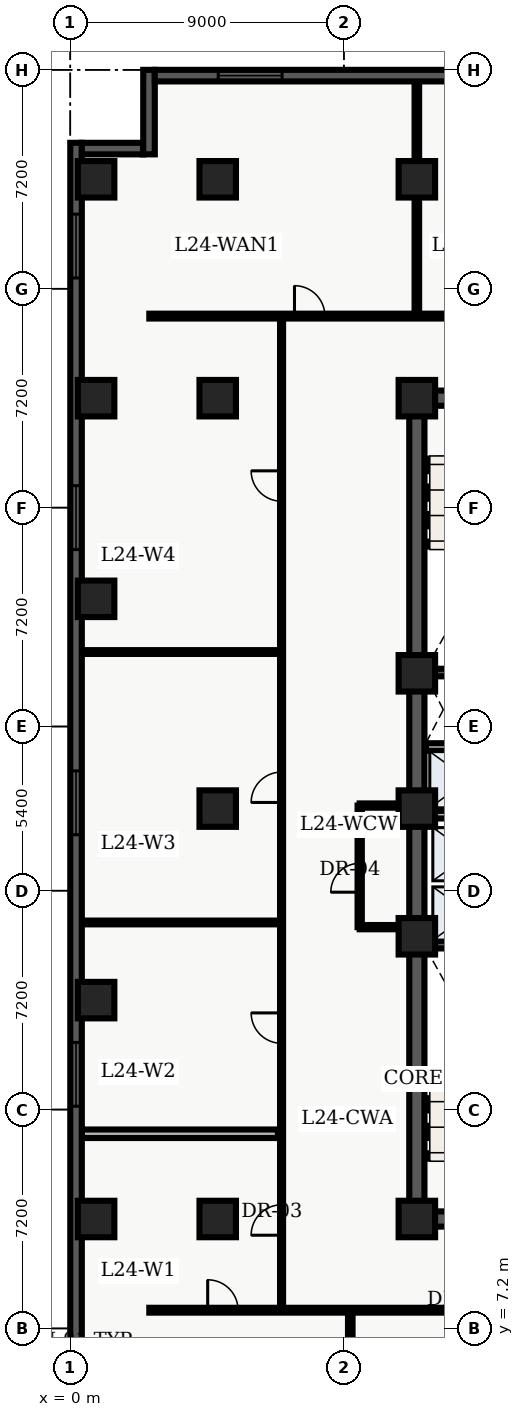
"""IFC4 building model, lengths in metres.
Left out: names, types, materials, properties, quantities, classifications, styles, units other than length and angle.
Written with IfcOpenShell. Run it as: python <this file> out.ifc"""

import sys

from ifc_helpers import new_model, entity, si_unit, converted_unit, direction, frame, origin_with_axes, origin_2d_with_axis, place, context, subcontext, project, spatial, polyline, rectangle, outline, extrude, element, fill, save


model = new_model("IFC4")
c1 = context("Model", 3, precision=1e-05, world=origin_with_axes(), true_north=direction((0.0, 1.0)))
c2 = subcontext(c1, "Body", "Model", "MODEL_VIEW")
j1 = project(units=[si_unit("LENGTHUNIT", "METRE"), converted_unit("PLANEANGLEUNIT", "DEGREE", entity("IfcPlaneAngleMeasure", 0.017), si_unit("PLANEANGLEUNIT", "RADIAN"), dimensions=[0, 0, 0, 0, 0, 0, 0])], contexts=[c1])
p1 = place(None, origin_with_axes())
s1 = spatial("IfcSite", under=j1, at=p1, CompositionType="ELEMENT")
p2 = place(p1, origin_with_axes())
s2 = spatial("IfcBuilding", under=s1, at=p2, CompositionType="ELEMENT")
p3 = place(p2, frame((0.0, 0.0, 100.8), z_axis=(0.0, 0.0, 1.0), x_axis=(1.0, 0.0, 0.0)))
s3 = spatial("IfcBuildingStorey", under=s2, at=p3, CompositionType="ELEMENT", Elevation=100.8)
p4 = place(p3, frame((11.4, 10.8, 0.0), z_axis=(0.0, 0.0, 1.0), x_axis=(0.0, 1.0, 0.0)))
e1 = element("IfcWall", 1, at=p4, inside=s3, PredefinedType="SHEAR", context=c2, shape_type="SweptSolid", body=[
    extrude(outline(polyline([(0.0, -0.25), (27.0, -0.25), (27.0, 0.25), (0.0, 0.25), (0.0, -0.25)])), origin_with_axes(), (0.0, 0.0, 1.0), 3.66),
])
p5 = place(p3, frame((11.4, 10.8, 0.0), z_axis=(0.0, 0.0, 1.0), x_axis=(1.0, 0.0, 0.0)))
e2 = element("IfcWall", 2, at=p5, inside=s3, PredefinedType="SHEAR", context=c2, shape_type="SweptSolid", body=[
    extrude(outline(polyline([(0.0, -0.25), (7.2, -0.25), (7.2, 0.25), (0.0, 0.25), (0.0, -0.25)])), origin_with_axes(), (0.0, 0.0, 1.0), 3.66),
])
p6 = place(p5, frame((2.625, 0.0, 0.0), z_axis=(0.0, 0.0, 1.0), x_axis=(1.0, 0.0, 0.0)))
e3 = element("IfcOpeningElement", 3, at=p6, cuts=e2, PredefinedType="OPENING", context=c2, shape_type="SweptSolid", body=[
    extrude(rectangle(XDim=1.05, YDim=0.52, at=origin_2d_with_axis()), origin_with_axes(), (0.0, 0.0, 1.0), 2.15),
])
p7 = place(p3, frame((11.4, 37.8, 0.0), z_axis=(0.0, 0.0, 1.0), x_axis=(1.0, 0.0, 0.0)))
e4 = element("IfcWall", 4, at=p7, inside=s3, PredefinedType="SHEAR", context=c2, shape_type="SweptSolid", body=[
    extrude(outline(polyline([(0.0, -0.25), (7.2, -0.25), (7.2, 0.25), (0.0, 0.25), (0.0, -0.25)])), origin_with_axes(), (0.0, 0.0, 1.0), 3.66),
])
p8 = place(p7, frame((2.625, 0.0, 0.0), z_axis=(0.0, 0.0, 1.0), x_axis=(1.0, 0.0, 0.0)))
e5 = element("IfcOpeningElement", 5, at=p8, cuts=e4, PredefinedType="OPENING", context=c2, shape_type="SweptSolid", body=[
    extrude(rectangle(XDim=1.05, YDim=0.52, at=origin_2d_with_axis()), origin_with_axes(), (0.0, 0.0, 1.0), 2.15),
])
for number, where, z_axis, x_axis in (
    (6, (11.65, 19.825, 0.0), (0.0, 0.0, 1.0), (1.0, 0.0, 0.0)),
    (7, (11.65, 28.775, 0.0), (0.0, 0.0, 1.0), (1.0, 0.0, 0.0)),
):
    element("IfcWall", number, at=place(p3, frame(where, z_axis=z_axis, x_axis=x_axis)), inside=s3, PredefinedType="SHEAR", context=c2, shape_type="SweptSolid", body=[
        extrude(outline(polyline([(0.0, -0.125), (6.7, -0.125), (6.7, 0.125), (0.0, 0.125), (0.0, -0.125)])), origin_with_axes(), (0.0, 0.0, 1.0), 3.66),
    ])
p9 = place(p3, frame((11.7, 24.1, 0.0), z_axis=(0.0, 0.0, 1.0), x_axis=(1.0, 0.0, 0.0)))
e8 = element("IfcWall", 8, at=p9, inside=s3, PredefinedType="SOLIDWALL", context=c2, shape_type="SweptSolid", body=[
    extrude(outline(polyline([(0.0, -0.125), (6.6, -0.125), (6.6, 0.125), (0.0, 0.125), (0.0, -0.125)])), origin_with_axes(), (0.0, 0.0, 1.0), 2.7),
])
p10 = place(p9, frame((3.75, 0.0, 0.0), z_axis=(0.0, 0.0, 1.0), x_axis=(1.0, 0.0, 0.0)))
e9 = element("IfcOpeningElement", 9, at=p10, cuts=e8, PredefinedType="OPENING", context=c2, shape_type="SweptSolid", body=[
    extrude(rectangle(XDim=0.9, YDim=0.27, at=origin_2d_with_axis()), origin_with_axes(), (0.0, 0.0, 1.0), 2.15),
])
p11 = place(p3, frame((11.7, 26.325, 0.0), z_axis=(0.0, 0.0, 1.0), x_axis=(1.0, 0.0, 0.0)))
e10 = element("IfcWall", 10, at=p11, inside=s3, PredefinedType="SOLIDWALL", context=c2, shape_type="SweptSolid", body=[
    extrude(outline(polyline([(0.0, -0.125), (6.6, -0.125), (6.6, 0.125), (0.0, 0.125), (0.0, -0.125)])), origin_with_axes(), (0.0, 0.0, 1.0), 2.7),
])
p12 = place(p11, frame((3.5, 0.0, 0.0), z_axis=(0.0, 0.0, 1.0), x_axis=(1.0, 0.0, 0.0)))
e11 = element("IfcOpeningElement", 11, at=p12, cuts=e10, PredefinedType="OPENING", context=c2, shape_type="SweptSolid", body=[
    extrude(rectangle(XDim=0.9, YDim=0.27, at=origin_2d_with_axis()), origin_with_axes(), (0.0, 0.0, 1.0), 2.15),
])
for number, where, z_axis, x_axis in (
    (12, (11.4, 10.8, 0.0), (0.0, 0.0, 1.0), (1.0, 0.0, 0.0)),
    (13, (11.4, 20.1, 0.0), (0.0, 0.0, 1.0), (1.0, 0.0, 0.0)),
    (14, (11.4, 24.3, 0.0), (0.0, 0.0, 1.0), (1.0, 0.0, 0.0)),
    (15, (11.4, 28.75, 0.0), (0.0, 0.0, 1.0), (1.0, 0.0, 0.0)),
    (16, (11.4, 37.8, 0.0), (0.0, 0.0, 1.0), (1.0, 0.0, 0.0)),
    (17, (11.4, 45.0, 0.0), (0.0, 0.0, 1.0), (1.0, 0.0, 0.0)),
    (18, (4.85, 10.8, 0.0), (0.0, 0.0, 1.0), (1.0, 0.0, 0.0)),
    (19, (4.85, 24.3, 0.0), (0.0, 0.0, 1.0), (1.0, 0.0, 0.0)),
    (20, (4.85, 37.8, 0.0), (0.0, 0.0, 1.0), (1.0, 0.0, 0.0)),
    (21, (4.85, 45.0, 0.0), (0.0, 0.0, 1.0), (1.0, 0.0, 0.0)),
    (22, (0.85, 10.8, 0.0), (0.0, 0.0, 1.0), (1.0, 0.0, 0.0)),
    (23, (0.85, 18.0, 0.0), (0.0, 0.0, 1.0), (1.0, 0.0, 0.0)),
    (24, (0.85, 31.2, 0.0), (0.0, 0.0, 1.0), (1.0, 0.0, 0.0)),
    (25, (0.85, 37.8, 0.0), (0.0, 0.0, 1.0), (1.0, 0.0, 0.0)),
    (26, (0.85, 45.0, 0.0), (0.0, 0.0, 1.0), (1.0, 0.0, 0.0)),
):
    element("IfcColumn", number, at=place(p3, frame(where, z_axis=z_axis, x_axis=x_axis)), inside=s3, PredefinedType="COLUMN", context=c2, shape_type="SweptSolid", body=[
        extrude(rectangle(XDim=1.2, YDim=1.2, at=origin_2d_with_axis()), origin_with_axes(), (0.0, 0.0, 1.0), 3.9),
    ])
p13 = place(p3, frame((9.52, 20.4, 0.0), z_axis=(0.0, 0.0, 1.0), x_axis=(0.0, 1.0, 0.0)))
e27 = element("IfcWall", 27, at=p13, inside=s3, PredefinedType="PARTITIONING", context=c2, shape_type="SweptSolid", body=[
    extrude(outline(polyline([(0.0, -0.07), (4.0, -0.07), (4.0, 0.07), (0.0, 0.07), (0.0, -0.07)])), origin_with_axes(), (0.0, 0.0, 1.0), 2.7),
])
p14 = place(p13, frame((1.625, 0.0, 0.0), z_axis=(0.0, 0.0, 1.0), x_axis=(1.0, 0.0, 0.0)))
e28 = element("IfcOpeningElement", 28, at=p14, cuts=e27, PredefinedType="OPENING", context=c2, shape_type="SweptSolid", body=[
    extrude(rectangle(XDim=0.95, YDim=0.16, at=origin_2d_with_axis()), origin_with_axes(), (0.0, 0.0, 1.0), 2.15),
])
for number, where, z_axis, x_axis in (
    (29, (9.52, 20.4, 0.0), (0.0, 0.0, 1.0), (1.0, 0.0, 0.0)),
    (30, (9.52, 24.4, 0.0), (0.0, 0.0, 1.0), (1.0, 0.0, 0.0)),
):
    element("IfcWall", number, at=place(p3, frame(where, z_axis=z_axis, x_axis=x_axis)), inside=s3, PredefinedType="PARTITIONING", context=c2, shape_type="SweptSolid", body=[
        extrude(outline(polyline([(0.0, -0.07), (1.58, -0.07), (1.58, 0.07), (0.0, 0.07), (0.0, -0.07)])), origin_with_axes(), (0.0, 0.0, 1.0), 2.7),
    ])
p15 = place(p3, frame((2.6, 7.8, 0.0), z_axis=(0.0, 0.0, 1.0), x_axis=(1.0, 0.0, 0.0)))
e31 = element("IfcWall", 31, at=p15, inside=s3, PredefinedType="PARTITIONING", context=c2, shape_type="SweptSolid", body=[
    extrude(outline(polyline([(0.0, -0.08), (18.625, -0.08), (18.625, 0.08), (0.0, 0.08), (0.0, -0.08)])), origin_with_axes(), (0.0, 0.0, 1.0), 2.7),
])
p16 = place(p15, frame((2.42, 0.0, 0.0), z_axis=(0.0, 0.0, 1.0), x_axis=(1.0, 0.0, 0.0)))
e32 = element("IfcOpeningElement", 32, at=p16, cuts=e31, PredefinedType="OPENING", context=c2, shape_type="SweptSolid", body=[
    extrude(rectangle(XDim=1.0, YDim=0.18, at=origin_2d_with_axis()), origin_with_axes(), (0.0, 0.0, 1.0), 2.15),
])
p17 = place(p15, frame((10.523, 0.0, 0.0), z_axis=(0.0, 0.0, 1.0), x_axis=(1.0, 0.0, 0.0)))
e33 = element("IfcOpeningElement", 33, at=p17, cuts=e31, PredefinedType="OPENING", context=c2, shape_type="SweptSolid", body=[
    extrude(rectangle(XDim=1.2, YDim=0.18, at=origin_2d_with_axis()), origin_with_axes(), (0.0, 0.0, 1.0), 2.2),
])
p18 = place(p15, frame((16.468, 0.0, 0.0), z_axis=(0.0, 0.0, 1.0), x_axis=(1.0, 0.0, 0.0)))
e34 = element("IfcOpeningElement", 34, at=p18, cuts=e31, PredefinedType="OPENING", context=c2, shape_type="SweptSolid", body=[
    extrude(rectangle(XDim=1.0, YDim=0.18, at=origin_2d_with_axis()), origin_with_axes(), (0.0, 0.0, 1.0), 2.15),
])
p19 = place(p3, frame((2.6, 40.5, 0.0), z_axis=(0.0, 0.0, 1.0), x_axis=(1.0, 0.0, 0.0)))
e35 = element("IfcWall", 35, at=p19, inside=s3, PredefinedType="PARTITIONING", context=c2, shape_type="SweptSolid", body=[
    extrude(outline(polyline([(0.0, -0.08), (18.65, -0.08), (18.65, 0.08), (0.0, 0.08), (0.0, -0.08)])), origin_with_axes(), (0.0, 0.0, 1.0), 2.7),
])
p20 = place(p19, frame((5.275, 0.0, 0.0), z_axis=(0.0, 0.0, 1.0), x_axis=(1.0, 0.0, 0.0)))
e36 = element("IfcOpeningElement", 36, at=p20, cuts=e35, PredefinedType="OPENING", context=c2, shape_type="SweptSolid", body=[
    extrude(rectangle(XDim=1.0, YDim=0.18, at=origin_2d_with_axis()), origin_with_axes(), (0.0, 0.0, 1.0), 2.15),
])
p21 = place(p19, frame((12.61, 0.0, 0.0), z_axis=(0.0, 0.0, 1.0), x_axis=(1.0, 0.0, 0.0)))
e37 = element("IfcOpeningElement", 37, at=p21, cuts=e35, PredefinedType="OPENING", context=c2, shape_type="SweptSolid", body=[
    extrude(rectangle(XDim=1.2, YDim=0.18, at=origin_2d_with_axis()), origin_with_axes(), (0.0, 0.0, 1.0), 2.2),
])
p22 = place(p3, frame((6.95, 7.8, 0.0), z_axis=(0.0, 0.0, 1.0), x_axis=(0.0, 1.0, 0.0)))
e38 = element("IfcWall", 38, at=p22, inside=s3, PredefinedType="PARTITIONING", context=c2, shape_type="SweptSolid", body=[
    extrude(outline(polyline([(0.0, -0.05), (32.7, -0.05), (32.7, 0.05), (0.0, 0.05), (0.0, -0.05)])), origin_with_axes(), (0.0, 0.0, 1.0), 2.7),
])
p23 = place(p22, frame((2.967, 0.0, 0.0), z_axis=(0.0, 0.0, 1.0), x_axis=(1.0, 0.0, 0.0)))
e39 = element("IfcOpeningElement", 39, at=p23, cuts=e38, PredefinedType="OPENING", context=c2, shape_type="SweptSolid", body=[
    extrude(rectangle(XDim=1.0, YDim=0.12, at=origin_2d_with_axis()), origin_with_axes(), (0.0, 0.0, 1.0), 2.15),
])
p24 = place(p22, frame((9.279, 0.0, 0.0), z_axis=(0.0, 0.0, 1.0), x_axis=(1.0, 0.0, 0.0)))
e40 = element("IfcOpeningElement", 40, at=p24, cuts=e38, PredefinedType="OPENING", context=c2, shape_type="SweptSolid", body=[
    extrude(rectangle(XDim=1.0, YDim=0.12, at=origin_2d_with_axis()), origin_with_axes(), (0.0, 0.0, 1.0), 2.15),
])
p25 = place(p22, frame((17.202, 0.0, 0.0), z_axis=(0.0, 0.0, 1.0), x_axis=(1.0, 0.0, 0.0)))
e41 = element("IfcOpeningElement", 41, at=p25, cuts=e38, PredefinedType="OPENING", context=c2, shape_type="SweptSolid", body=[
    extrude(rectangle(XDim=1.0, YDim=0.12, at=origin_2d_with_axis()), origin_with_axes(), (0.0, 0.0, 1.0), 2.15),
])
p26 = place(p22, frame((27.11, 0.0, 0.0), z_axis=(0.0, 0.0, 1.0), x_axis=(1.0, 0.0, 0.0)))
e42 = element("IfcOpeningElement", 42, at=p26, cuts=e38, PredefinedType="OPENING", context=c2, shape_type="SweptSolid", body=[
    extrude(rectangle(XDim=1.0, YDim=0.12, at=origin_2d_with_axis()), origin_with_axes(), (0.0, 0.0, 1.0), 2.15),
])
p27 = place(p3, frame((0.375, 13.604, 0.0), z_axis=(0.0, 0.0, 1.0), x_axis=(1.0, 0.0, 0.0)))
e43 = element("IfcWall", 43, at=p27, inside=s3, PredefinedType="PARTITIONING", context=c2, shape_type="SweptSolid", body=[
    extrude(outline(polyline([(0.0, -0.14), (6.455, -0.14), (6.455, 0.14), (0.0, 0.14), (0.0, -0.14)])), origin_with_axes(), (0.0, 0.0, 1.0), 2.7),
])
for number, where, z_axis, x_axis in (
    (44, (0.375, 20.554, 0.0), (0.0, 0.0, 1.0), (1.0, 0.0, 0.0)),
    (45, (0.375, 29.45, 0.0), (0.0, 0.0, 1.0), (1.0, 0.0, 0.0)),
):
    element("IfcWall", number, at=place(p3, frame(where, z_axis=z_axis, x_axis=x_axis)), inside=s3, PredefinedType="PARTITIONING", context=c2, shape_type="SweptSolid", body=[
        extrude(outline(polyline([(0.0, -0.062), (6.455, -0.062), (6.455, 0.062), (0.0, 0.062), (0.0, -0.062)])), origin_with_axes(), (0.0, 0.0, 1.0), 2.7),
    ])
p28 = place(p3, frame((9.21, 0.36, 0.0), z_axis=(0.0, 0.0, 1.0), x_axis=(0.0, 1.0, 0.0)))
e46 = element("IfcWall", 46, at=p28, inside=s3, PredefinedType="PARTITIONING", context=c2, shape_type="SweptSolid", body=[
    extrude(outline(polyline([(0.0, -0.075), (7.34, -0.075), (7.34, 0.075), (0.0, 0.075), (0.0, -0.075)])), origin_with_axes(), (0.0, 0.0, 1.0), 2.7),
])
p29 = place(p3, frame((11.4, 40.6, 0.0), z_axis=(0.0, 0.0, 1.0), x_axis=(0.0, 1.0, 0.0)))
e47 = element("IfcWall", 47, at=p29, inside=s3, PredefinedType="PARTITIONING", context=c2, shape_type="SweptSolid", body=[
    extrude(outline(polyline([(0.0, -0.075), (7.64, -0.075), (7.64, 0.075), (0.0, 0.075), (0.0, -0.075)])), origin_with_axes(), (0.0, 0.0, 1.0), 2.7),
])
p30 = place(p3, frame((0.19, 2.78, 0.0), z_axis=(0.0, 0.0, 1.0), x_axis=(0.0, 1.0, 0.0)))
e48 = element("IfcWall", 48, at=p30, inside=s3, PredefinedType="SOLIDWALL", context=c2, shape_type="SweptSolid", body=[
    extrude(outline(polyline([(0.0, -0.19), (43.42, -0.19), (43.42, 0.19), (0.0, 0.19), (0.0, -0.19)])), origin_with_axes(), (0.0, 0.0, 1.0), 3.66),
])
p31 = place(p30, frame((2.946, 0.0, 0.45), z_axis=(0.0, 0.0, 1.0), x_axis=(1.0, 0.0, 0.0)))
e49 = element("IfcOpeningElement", 49, at=p31, cuts=e48, PredefinedType="OPENING", context=c2, shape_type="SweptSolid", body=[
    extrude(rectangle(XDim=2.1, YDim=0.4, at=origin_2d_with_axis()), origin_with_axes(), (0.0, 0.0, 1.0), 2.2),
])
p32 = place(p30, frame((12.778, 0.0, 0.45), z_axis=(0.0, 0.0, 1.0), x_axis=(1.0, 0.0, 0.0)))
e50 = element("IfcOpeningElement", 50, at=p32, cuts=e48, PredefinedType="OPENING", context=c2, shape_type="SweptSolid", body=[
    extrude(rectangle(XDim=2.1, YDim=0.4, at=origin_2d_with_axis()), origin_with_axes(), (0.0, 0.0, 1.0), 2.2),
])
p33 = place(p30, frame((21.71, 0.0, 0.45), z_axis=(0.0, 0.0, 1.0), x_axis=(1.0, 0.0, 0.0)))
e51 = element("IfcOpeningElement", 51, at=p33, cuts=e48, PredefinedType="OPENING", context=c2, shape_type="SweptSolid", body=[
    extrude(rectangle(XDim=2.1, YDim=0.4, at=origin_2d_with_axis()), origin_with_axes(), (0.0, 0.0, 1.0), 2.2),
])
p34 = place(p30, frame((31.092, 0.0, 0.45), z_axis=(0.0, 0.0, 1.0), x_axis=(1.0, 0.0, 0.0)))
e52 = element("IfcOpeningElement", 52, at=p34, cuts=e48, PredefinedType="OPENING", context=c2, shape_type="SweptSolid", body=[
    extrude(rectangle(XDim=2.1, YDim=0.4, at=origin_2d_with_axis()), origin_with_axes(), (0.0, 0.0, 1.0), 2.2),
])
p35 = place(p30, frame((40.024, 0.0, 0.45), z_axis=(0.0, 0.0, 1.0), x_axis=(1.0, 0.0, 0.0)))
e53 = element("IfcOpeningElement", 53, at=p35, cuts=e48, PredefinedType="OPENING", context=c2, shape_type="SweptSolid", body=[
    extrude(rectangle(XDim=2.1, YDim=0.4, at=origin_2d_with_axis()), origin_with_axes(), (0.0, 0.0, 1.0), 2.2),
])
p36 = place(p3, frame((0.38, 46.01, 0.0), z_axis=(0.0, 0.0, 1.0), x_axis=(1.0, 0.0, 0.0)))
e54 = element("IfcWall", 54, at=p36, inside=s3, PredefinedType="SOLIDWALL", context=c2, shape_type="SweptSolid", body=[
    extrude(outline(polyline([(0.0, -0.19), (2.02, -0.19), (2.02, 0.19), (0.0, 0.19), (0.0, -0.19)])), origin_with_axes(), (0.0, 0.0, 1.0), 3.66),
])
p37 = place(p3, frame((2.59, 45.82, 0.0), z_axis=(0.0, 0.0, 1.0), x_axis=(0.0, 1.0, 0.0)))
e55 = element("IfcWall", 55, at=p37, inside=s3, PredefinedType="SOLIDWALL", context=c2, shape_type="SweptSolid", body=[
    extrude(outline(polyline([(0.0, -0.19), (2.78, -0.19), (2.78, 0.19), (0.0, 0.19), (0.0, -0.19)])), origin_with_axes(), (0.0, 0.0, 1.0), 3.66),
])
p38 = place(p3, frame((2.78, 48.41, 0.0), z_axis=(0.0, 0.0, 1.0), x_axis=(1.0, 0.0, 0.0)))
e56 = element("IfcWall", 56, at=p38, inside=s3, PredefinedType="SOLIDWALL", context=c2, shape_type="SweptSolid", body=[
    extrude(outline(polyline([(0.0, -0.19), (16.42, -0.19), (16.42, 0.19), (0.0, 0.19), (0.0, -0.19)])), origin_with_axes(), (0.0, 0.0, 1.0), 3.66),
])
p39 = place(p38, frame((3.137, 0.0, 0.45), z_axis=(0.0, 0.0, 1.0), x_axis=(1.0, 0.0, 0.0)))
e57 = element("IfcOpeningElement", 57, at=p39, cuts=e56, PredefinedType="OPENING", context=c2, shape_type="SweptSolid", body=[
    extrude(rectangle(XDim=2.1, YDim=0.4, at=origin_2d_with_axis()), origin_with_axes(), (0.0, 0.0, 1.0), 2.2),
])
p40 = place(p38, frame((13.283, 0.0, 0.45), z_axis=(0.0, 0.0, 1.0), x_axis=(1.0, 0.0, 0.0)))
e58 = element("IfcOpeningElement", 58, at=p40, cuts=e56, PredefinedType="OPENING", context=c2, shape_type="SweptSolid", body=[
    extrude(rectangle(XDim=2.1, YDim=0.4, at=origin_2d_with_axis()), origin_with_axes(), (0.0, 0.0, 1.0), 2.2),
])
p41 = place(p13, frame((1.625, 0.0, 0.0), z_axis=(0.0, 0.0, 1.0), x_axis=(1.0, 0.0, 0.0)))
e59 = element("IfcDoor", 59, at=p41, inside=s3, OperationType="SINGLE_SWING_LEFT", PredefinedType="DOOR", context=c2, shape_type="SweptSolid", body=[
    extrude(rectangle(XDim=0.95, YDim=0.084, at=origin_2d_with_axis()), origin_with_axes(), (0.0, 0.0, 1.0), 2.15),
])
fill(e28, e59)
p42 = place(p22, frame((2.967, 0.0, 0.0), z_axis=(0.0, 0.0, 1.0), x_axis=(1.0, 0.0, 0.0)))
e60 = element("IfcDoor", 60, at=p42, inside=s3, OperationType="SINGLE_SWING_LEFT", PredefinedType="DOOR", context=c2, shape_type="SweptSolid", body=[
    extrude(rectangle(XDim=1.0, YDim=0.06, at=origin_2d_with_axis()), origin_with_axes(), (0.0, 0.0, 1.0), 2.15),
])
fill(e39, e60)
p43 = place(p22, frame((9.279, 0.0, 0.0), z_axis=(0.0, 0.0, 1.0), x_axis=(1.0, 0.0, 0.0)))
e61 = element("IfcDoor", 61, at=p43, inside=s3, OperationType="SINGLE_SWING_RIGHT", PredefinedType="DOOR", context=c2, shape_type="SweptSolid", body=[
    extrude(rectangle(XDim=1.0, YDim=0.06, at=origin_2d_with_axis()), origin_with_axes(), (0.0, 0.0, 1.0), 2.15),
])
fill(e40, e61)
p44 = place(p22, frame((17.202, 0.0, 0.0), z_axis=(0.0, 0.0, 1.0), x_axis=(1.0, 0.0, 0.0)))
e62 = element("IfcDoor", 62, at=p44, inside=s3, OperationType="SINGLE_SWING_LEFT", PredefinedType="DOOR", context=c2, shape_type="SweptSolid", body=[
    extrude(rectangle(XDim=1.0, YDim=0.06, at=origin_2d_with_axis()), origin_with_axes(), (0.0, 0.0, 1.0), 2.15),
])
fill(e41, e62)
p45 = place(p22, frame((27.11, 0.0, 0.0), z_axis=(0.0, 0.0, 1.0), x_axis=(1.0, 0.0, 0.0)))
e63 = element("IfcDoor", 63, at=p45, inside=s3, OperationType="SINGLE_SWING_RIGHT", PredefinedType="DOOR", context=c2, shape_type="SweptSolid", body=[
    extrude(rectangle(XDim=1.0, YDim=0.06, at=origin_2d_with_axis()), origin_with_axes(), (0.0, 0.0, 1.0), 2.15),
])
fill(e42, e63)
p46 = place(p15, frame((2.42, 0.0, 0.0), z_axis=(0.0, 0.0, 1.0), x_axis=(1.0, 0.0, 0.0)))
e64 = element("IfcDoor", 64, at=p46, inside=s3, OperationType="SINGLE_SWING_LEFT", PredefinedType="DOOR", context=c2, shape_type="SweptSolid", body=[
    extrude(rectangle(XDim=1.0, YDim=0.09, at=origin_2d_with_axis()), origin_with_axes(), (0.0, 0.0, 1.0), 2.15),
])
fill(e32, e64)
p47 = place(p19, frame((5.275, 0.0, 0.0), z_axis=(0.0, 0.0, 1.0), x_axis=(1.0, 0.0, 0.0)))
e65 = element("IfcDoor", 65, at=p47, inside=s3, OperationType="SINGLE_SWING_LEFT", PredefinedType="DOOR", context=c2, shape_type="SweptSolid", body=[
    extrude(rectangle(XDim=1.0, YDim=0.09, at=origin_2d_with_axis()), origin_with_axes(), (0.0, 0.0, 1.0), 2.15),
])
fill(e36, e65)
p48 = place(p30, frame((12.778, 0.0, 0.45), z_axis=(0.0, 0.0, 1.0), x_axis=(1.0, 0.0, 0.0)))
e66 = element("IfcWindow", 66, at=p48, inside=s3, PredefinedType="WINDOW", context=c2, shape_type="SweptSolid", body=[
    extrude(rectangle(XDim=2.1, YDim=0.09, at=origin_2d_with_axis()), origin_with_axes(), (0.0, 0.0, 1.0), 2.2),
])
fill(e50, e66)
p49 = place(p30, frame((21.71, 0.0, 0.45), z_axis=(0.0, 0.0, 1.0), x_axis=(1.0, 0.0, 0.0)))
e67 = element("IfcWindow", 67, at=p49, inside=s3, PredefinedType="WINDOW", context=c2, shape_type="SweptSolid", body=[
    extrude(rectangle(XDim=2.1, YDim=0.09, at=origin_2d_with_axis()), origin_with_axes(), (0.0, 0.0, 1.0), 2.2),
])
fill(e51, e67)
p50 = place(p30, frame((31.092, 0.0, 0.45), z_axis=(0.0, 0.0, 1.0), x_axis=(1.0, 0.0, 0.0)))
e68 = element("IfcWindow", 68, at=p50, inside=s3, PredefinedType="WINDOW", context=c2, shape_type="SweptSolid", body=[
    extrude(rectangle(XDim=2.1, YDim=0.09, at=origin_2d_with_axis()), origin_with_axes(), (0.0, 0.0, 1.0), 2.2),
])
fill(e52, e68)
p51 = place(p30, frame((40.024, 0.0, 0.45), z_axis=(0.0, 0.0, 1.0), x_axis=(1.0, 0.0, 0.0)))
e69 = element("IfcWindow", 69, at=p51, inside=s3, PredefinedType="WINDOW", context=c2, shape_type="SweptSolid", body=[
    extrude(rectangle(XDim=2.1, YDim=0.09, at=origin_2d_with_axis()), origin_with_axes(), (0.0, 0.0, 1.0), 2.2),
])
fill(e53, e69)
p52 = place(p38, frame((3.137, 0.0, 0.45), z_axis=(0.0, 0.0, 1.0), x_axis=(1.0, 0.0, 0.0)))
e70 = element("IfcWindow", 70, at=p52, inside=s3, PredefinedType="WINDOW", context=c2, shape_type="SweptSolid", body=[
    extrude(rectangle(XDim=2.1, YDim=0.09, at=origin_2d_with_axis()), origin_with_axes(), (0.0, 0.0, 1.0), 2.2),
])
fill(e57, e70)
save(model, sys.argv[1])
